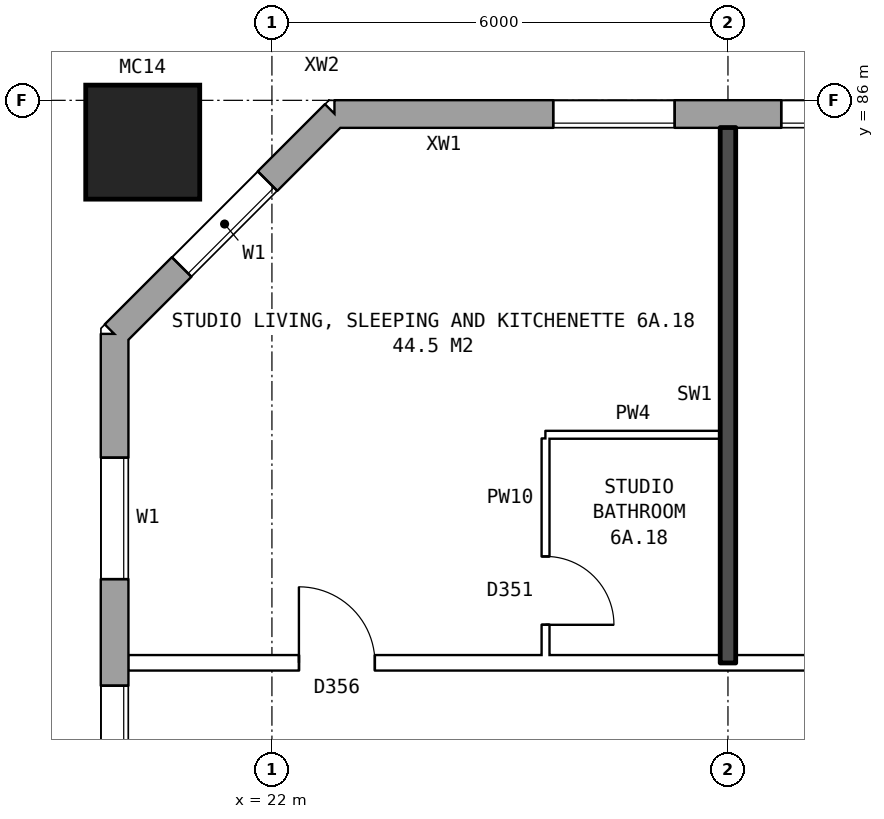
"""IFC4 building model, lengths in metres.
Left out: names, types, materials, properties, quantities, classifications, styles, units other than length and angle.
Written with IfcOpenShell. Run it as: python <this file> out.ifc"""

import sys

from ifc_helpers import new_model, si_unit, direction, frame, frame_2d, origin, origin_2d, place, context, subcontext, project, spatial, rectangle, hollow_rectangle, extrude, element, fill, save


model = new_model("IFC4")
c1 = context("Model", 3, precision=1e-05, world=origin(), true_north=direction((0.0, 1.0)))
c2 = subcontext(c1, "Body", "Model", "MODEL_VIEW")
j1 = project(units=[si_unit("LENGTHUNIT", "METRE"), si_unit("PLANEANGLEUNIT", "RADIAN")], contexts=[c1])
p1 = place(None, origin())
s1 = spatial("IfcSite", under=j1, at=p1, CompositionType="ELEMENT")
p2 = place(p1, origin())
s2 = spatial("IfcBuilding", under=s1, at=p2, CompositionType="ELEMENT")
p3 = place(p2, frame((0.0, 0.0, 25.7)))
s3 = spatial("IfcBuildingStorey", under=s2, at=p3, CompositionType="ELEMENT", Elevation=25.7)
p4 = place(p3, frame((20.3, 85.45, 0.0), z_axis=(0.0, 0.0, 1.0), x_axis=(1.0, 0.0, 0.0)))
e1 = element("IfcColumn", 1, at=p4, inside=s3, PredefinedType="COLUMN", context=c2, shape_type="SweptSolid", body=[
    extrude(hollow_rectangle(XDim=1.5, YDim=1.5, WallThickness=0.08, at=origin_2d()), origin(), (0.0, 0.0, 1.0), 3.1),
])
p5 = place(p3, frame((72.925, 85.82, 0.0), z_axis=(0.0, 0.0, 1.0), x_axis=(-1.0, 0.0, 0.0)))
e2 = element("IfcWall", 2, at=p5, inside=s3, PredefinedType="STANDARD", context=c2, shape_type="SweptSolid", body=[
    extrude(rectangle(XDim=50.101, YDim=0.36, at=frame_2d((25.05, 0.0))), origin(), (0.0, 0.0, 1.0), 2.85),
])
p6 = place(p5, frame((0.625, 0.0, 0.8)))
e3 = element("IfcOpeningElement", 3, at=p6, cuts=e2, PredefinedType="OPENING", context=c2, shape_type="SweptSolid", body=[
    extrude(rectangle(XDim=1.6, YDim=1.8, at=frame_2d((0.8, 0.9))), frame((0.0, 0.19, 0.0), z_axis=(0.0, -1.0, 0.0), x_axis=(1.0, 0.0, 0.0)), (0.0, 0.0, 1.0), 0.38),
])
p7 = place(p5, frame((3.625, 0.0, 0.8)))
e4 = element("IfcOpeningElement", 4, at=p7, cuts=e2, PredefinedType="OPENING", context=c2, shape_type="SweptSolid", body=[
    extrude(rectangle(XDim=1.6, YDim=1.8, at=frame_2d((0.8, 0.9))), frame((0.0, 0.19, 0.0), z_axis=(0.0, -1.0, 0.0), x_axis=(1.0, 0.0, 0.0)), (0.0, 0.0, 1.0), 0.38),
])
p8 = place(p5, frame((5.525, 0.0, 0.8)))
e5 = element("IfcOpeningElement", 5, at=p8, cuts=e2, PredefinedType="OPENING", context=c2, shape_type="SweptSolid", body=[
    extrude(rectangle(XDim=1.4, YDim=1.8, at=frame_2d((0.7, 0.9))), frame((0.0, 0.19, 0.0), z_axis=(0.0, -1.0, 0.0), x_axis=(1.0, 0.0, 0.0)), (0.0, 0.0, 1.0), 0.38),
])
p9 = place(p5, frame((9.175, 0.0, 0.15)))
e6 = element("IfcOpeningElement", 6, at=p9, cuts=e2, PredefinedType="OPENING", context=c2, shape_type="SweptSolid", body=[
    extrude(rectangle(XDim=1.0, YDim=0.9, at=frame_2d((0.5, 0.45))), frame((0.0, 0.19, 0.0), z_axis=(0.0, -1.0, 0.0), x_axis=(1.0, 0.0, 0.0)), (0.0, 0.0, 1.0), 0.38),
])
p10 = place(p5, frame((12.625, 0.0, 0.8)))
e7 = element("IfcOpeningElement", 7, at=p10, cuts=e2, PredefinedType="OPENING", context=c2, shape_type="SweptSolid", body=[
    extrude(rectangle(XDim=1.6, YDim=1.8, at=frame_2d((0.8, 0.9))), frame((0.0, 0.19, 0.0), z_axis=(0.0, -1.0, 0.0), x_axis=(1.0, 0.0, 0.0)), (0.0, 0.0, 1.0), 0.38),
])
p11 = place(p5, frame((15.625, 0.0, 0.8)))
e8 = element("IfcOpeningElement", 8, at=p11, cuts=e2, PredefinedType="OPENING", context=c2, shape_type="SweptSolid", body=[
    extrude(rectangle(XDim=1.6, YDim=1.8, at=frame_2d((0.8, 0.9))), frame((0.0, 0.19, 0.0), z_axis=(0.0, -1.0, 0.0), x_axis=(1.0, 0.0, 0.0)), (0.0, 0.0, 1.0), 0.38),
])
p12 = place(p5, frame((18.625, 0.0, 0.8)))
e9 = element("IfcOpeningElement", 9, at=p12, cuts=e2, PredefinedType="OPENING", context=c2, shape_type="SweptSolid", body=[
    extrude(rectangle(XDim=1.6, YDim=1.8, at=frame_2d((0.8, 0.9))), frame((0.0, 0.19, 0.0), z_axis=(0.0, -1.0, 0.0), x_axis=(1.0, 0.0, 0.0)), (0.0, 0.0, 1.0), 0.38),
])
p13 = place(p5, frame((21.625, 0.0, 0.8)))
e10 = element("IfcOpeningElement", 10, at=p13, cuts=e2, PredefinedType="OPENING", context=c2, shape_type="SweptSolid", body=[
    extrude(rectangle(XDim=1.6, YDim=1.8, at=frame_2d((0.8, 0.9))), frame((0.0, 0.19, 0.0), z_axis=(0.0, -1.0, 0.0), x_axis=(1.0, 0.0, 0.0)), (0.0, 0.0, 1.0), 0.38),
])
p14 = place(p5, frame((24.625, 0.0, 0.8)))
e11 = element("IfcOpeningElement", 11, at=p14, cuts=e2, PredefinedType="OPENING", context=c2, shape_type="SweptSolid", body=[
    extrude(rectangle(XDim=1.6, YDim=1.8, at=frame_2d((0.8, 0.9))), frame((0.0, 0.19, 0.0), z_axis=(0.0, -1.0, 0.0), x_axis=(1.0, 0.0, 0.0)), (0.0, 0.0, 1.0), 0.38),
])
p15 = place(p5, frame((27.625, 0.0, 0.8)))
e12 = element("IfcOpeningElement", 12, at=p15, cuts=e2, PredefinedType="OPENING", context=c2, shape_type="SweptSolid", body=[
    extrude(rectangle(XDim=1.6, YDim=1.8, at=frame_2d((0.8, 0.9))), frame((0.0, 0.19, 0.0), z_axis=(0.0, -1.0, 0.0), x_axis=(1.0, 0.0, 0.0)), (0.0, 0.0, 1.0), 0.38),
])
p16 = place(p5, frame((30.625, 0.0, 0.8)))
e13 = element("IfcOpeningElement", 13, at=p16, cuts=e2, PredefinedType="OPENING", context=c2, shape_type="SweptSolid", body=[
    extrude(rectangle(XDim=1.6, YDim=1.8, at=frame_2d((0.8, 0.9))), frame((0.0, 0.19, 0.0), z_axis=(0.0, -1.0, 0.0), x_axis=(1.0, 0.0, 0.0)), (0.0, 0.0, 1.0), 0.38),
])
p17 = place(p5, frame((33.625, 0.0, 0.8)))
e14 = element("IfcOpeningElement", 14, at=p17, cuts=e2, PredefinedType="OPENING", context=c2, shape_type="SweptSolid", body=[
    extrude(rectangle(XDim=1.6, YDim=1.8, at=frame_2d((0.8, 0.9))), frame((0.0, 0.19, 0.0), z_axis=(0.0, -1.0, 0.0), x_axis=(1.0, 0.0, 0.0)), (0.0, 0.0, 1.0), 0.38),
])
p18 = place(p5, frame((36.625, 0.0, 0.8)))
e15 = element("IfcOpeningElement", 15, at=p18, cuts=e2, PredefinedType="OPENING", context=c2, shape_type="SweptSolid", body=[
    extrude(rectangle(XDim=1.6, YDim=1.8, at=frame_2d((0.8, 0.9))), frame((0.0, 0.19, 0.0), z_axis=(0.0, -1.0, 0.0), x_axis=(1.0, 0.0, 0.0)), (0.0, 0.0, 1.0), 0.38),
])
p19 = place(p5, frame((39.125, 0.0, 0.8)))
e16 = element("IfcOpeningElement", 16, at=p19, cuts=e2, PredefinedType="OPENING", context=c2, shape_type="SweptSolid", body=[
    extrude(rectangle(XDim=0.8, YDim=0.9, at=frame_2d((0.4, 0.45))), frame((0.0, 0.19, 0.0), z_axis=(0.0, -1.0, 0.0), x_axis=(1.0, 0.0, 0.0)), (0.0, 0.0, 1.0), 0.38),
])
p20 = place(p5, frame((42.625, 0.0, 0.8)))
e17 = element("IfcOpeningElement", 17, at=p20, cuts=e2, PredefinedType="OPENING", context=c2, shape_type="SweptSolid", body=[
    extrude(rectangle(XDim=1.6, YDim=1.8, at=frame_2d((0.8, 0.9))), frame((0.0, 0.19, 0.0), z_axis=(0.0, -1.0, 0.0), x_axis=(1.0, 0.0, 0.0)), (0.0, 0.0, 1.0), 0.38),
])
p21 = place(p5, frame((45.625, 0.0, 0.8)))
e18 = element("IfcOpeningElement", 18, at=p21, cuts=e2, PredefinedType="OPENING", context=c2, shape_type="SweptSolid", body=[
    extrude(rectangle(XDim=1.6, YDim=1.8, at=frame_2d((0.8, 0.9))), frame((0.0, 0.19, 0.0), z_axis=(0.0, -1.0, 0.0), x_axis=(1.0, 0.0, 0.0)), (0.0, 0.0, 1.0), 0.38),
])
p22 = place(p5, frame((7.225, 0.0, 1.4)))
e19 = element("IfcOpeningElement", 19, at=p22, cuts=e2, PredefinedType="OPENING", context=c2, shape_type="SweptSolid", body=[
    extrude(rectangle(XDim=1.0, YDim=1.2, at=frame_2d((0.5, 0.6))), frame((0.0, 0.19, 0.0), z_axis=(0.0, -1.0, 0.0), x_axis=(1.0, 0.0, 0.0)), (0.0, 0.0, 1.0), 0.38),
])
p23 = place(p5, frame((10.525, 0.0, 0.15)))
e20 = element("IfcOpeningElement", 20, at=p23, cuts=e2, PredefinedType="OPENING", context=c2, shape_type="SweptSolid", body=[
    extrude(rectangle(XDim=1.2, YDim=1.8, at=frame_2d((0.6, 0.9))), frame((0.0, 0.19, 0.0), z_axis=(0.0, -1.0, 0.0), x_axis=(1.0, 0.0, 0.0)), (0.0, 0.0, 1.0), 0.38),
])
p24 = place(p5, frame((41.375, 0.0, 1.7)))
e21 = element("IfcOpeningElement", 21, at=p24, cuts=e2, PredefinedType="OPENING", context=c2, shape_type="SweptSolid", body=[
    extrude(rectangle(XDim=0.8, YDim=0.9, at=frame_2d((0.4, 0.45))), frame((0.0, 0.19, 0.0), z_axis=(0.0, -1.0, 0.0), x_axis=(1.0, 0.0, 0.0)), (0.0, 0.0, 1.0), 0.38),
])
p25 = place(p3, frame((22.825, 85.82, 0.0), z_axis=(0.0, 0.0, 1.0), x_axis=(-0.707106781187, -0.707106781187, 0.0)))
e22 = element("IfcWall", 22, at=p25, inside=s3, PredefinedType="STANDARD", context=c2, shape_type="SweptSolid", body=[
    extrude(rectangle(XDim=4.094, YDim=0.36, at=frame_2d((2.047, 0.0))), origin(), (0.0, 0.0, 1.0), 2.85),
])
p26 = place(p25, frame((1.247, 0.0, 0.8)))
e23 = element("IfcOpeningElement", 23, at=p26, cuts=e22, PredefinedType="OPENING", context=c2, shape_type="SweptSolid", body=[
    extrude(rectangle(XDim=1.6, YDim=1.8, at=frame_2d((0.8, 0.9))), frame((0.0, 0.19, 0.0), z_axis=(0.0, -1.0, 0.0), x_axis=(1.0, 0.0, 0.0)), (0.0, 0.0, 1.0), 0.38),
])
p27 = place(p3, frame((19.93, 82.925, 0.0), z_axis=(0.0, 0.0, 1.0), x_axis=(0.0, -1.0, 0.0)))
e24 = element("IfcWall", 24, at=p27, inside=s3, PredefinedType="STANDARD", context=c2, shape_type="SweptSolid", body=[
    extrude(rectangle(XDim=25.851, YDim=0.36, at=frame_2d((12.925, 0.0))), origin(), (0.0, 0.0, 1.0), 2.85),
])
p28 = place(p27, frame((1.625, 0.0, 0.8)))
e25 = element("IfcOpeningElement", 25, at=p28, cuts=e24, PredefinedType="OPENING", context=c2, shape_type="SweptSolid", body=[
    extrude(rectangle(XDim=1.6, YDim=1.8, at=frame_2d((0.8, 0.9))), frame((0.0, 0.19, 0.0), z_axis=(0.0, -1.0, 0.0), x_axis=(1.0, 0.0, 0.0)), (0.0, 0.0, 1.0), 0.38),
])
p29 = place(p27, frame((4.625, 0.0, 0.8)))
e26 = element("IfcOpeningElement", 26, at=p29, cuts=e24, PredefinedType="OPENING", context=c2, shape_type="SweptSolid", body=[
    extrude(rectangle(XDim=1.6, YDim=1.8, at=frame_2d((0.8, 0.9))), frame((0.0, 0.19, 0.0), z_axis=(0.0, -1.0, 0.0), x_axis=(1.0, 0.0, 0.0)), (0.0, 0.0, 1.0), 0.38),
])
p30 = place(p27, frame((6.525, 0.0, 0.8)))
e27 = element("IfcOpeningElement", 27, at=p30, cuts=e24, PredefinedType="OPENING", context=c2, shape_type="SweptSolid", body=[
    extrude(rectangle(XDim=1.6, YDim=1.8, at=frame_2d((0.8, 0.9))), frame((0.0, 0.19, 0.0), z_axis=(0.0, -1.0, 0.0), x_axis=(1.0, 0.0, 0.0)), (0.0, 0.0, 1.0), 0.38),
])
p31 = place(p27, frame((8.425, 0.0, 1.1)))
e28 = element("IfcOpeningElement", 28, at=p31, cuts=e24, PredefinedType="OPENING", context=c2, shape_type="SweptSolid", body=[
    extrude(rectangle(XDim=0.8, YDim=1.5, at=frame_2d((0.4, 0.75))), frame((0.0, 0.19, 0.0), z_axis=(0.0, -1.0, 0.0), x_axis=(1.0, 0.0, 0.0)), (0.0, 0.0, 1.0), 0.38),
])
p32 = place(p27, frame((9.525, 0.0, 1.6)))
e29 = element("IfcOpeningElement", 29, at=p32, cuts=e24, PredefinedType="OPENING", context=c2, shape_type="SweptSolid", body=[
    extrude(rectangle(XDim=0.6, YDim=0.9, at=frame_2d((0.3, 0.45))), frame((0.0, 0.19, 0.0), z_axis=(0.0, -1.0, 0.0), x_axis=(1.0, 0.0, 0.0)), (0.0, 0.0, 1.0), 0.38),
])
p33 = place(p27, frame((11.525, 0.0, 0.8)))
e30 = element("IfcOpeningElement", 30, at=p33, cuts=e24, PredefinedType="OPENING", context=c2, shape_type="SweptSolid", body=[
    extrude(rectangle(XDim=0.6, YDim=0.9, at=frame_2d((0.3, 0.45))), frame((0.0, 0.19, 0.0), z_axis=(0.0, -1.0, 0.0), x_axis=(1.0, 0.0, 0.0)), (0.0, 0.0, 1.0), 0.38),
])
p34 = place(p27, frame((19.625, 0.0, 0.8)))
e31 = element("IfcOpeningElement", 31, at=p34, cuts=e24, PredefinedType="OPENING", context=c2, shape_type="SweptSolid", body=[
    extrude(rectangle(XDim=1.6, YDim=1.8, at=frame_2d((0.8, 0.9))), frame((0.0, 0.19, 0.0), z_axis=(0.0, -1.0, 0.0), x_axis=(1.0, 0.0, 0.0)), (0.0, 0.0, 1.0), 0.38),
])
p35 = place(p27, frame((22.625, 0.0, 0.8)))
e32 = element("IfcOpeningElement", 32, at=p35, cuts=e24, PredefinedType="OPENING", context=c2, shape_type="SweptSolid", body=[
    extrude(rectangle(XDim=1.6, YDim=1.8, at=frame_2d((0.8, 0.9))), frame((0.0, 0.19, 0.0), z_axis=(0.0, -1.0, 0.0), x_axis=(1.0, 0.0, 0.0)), (0.0, 0.0, 1.0), 0.38),
])
p36 = place(p27, frame((12.425, 0.0, 0.8)))
e33 = element("IfcOpeningElement", 33, at=p36, cuts=e24, PredefinedType="OPENING", context=c2, shape_type="SweptSolid", body=[
    extrude(rectangle(XDim=1.0, YDim=1.8, at=frame_2d((0.5, 0.9))), frame((0.0, 0.19, 0.0), z_axis=(0.0, -1.0, 0.0), x_axis=(1.0, 0.0, 0.0)), (0.0, 0.0, 1.0), 0.38),
])
p37 = place(p27, frame((13.725, 0.0, 0.8)))
e34 = element("IfcOpeningElement", 34, at=p37, cuts=e24, PredefinedType="OPENING", context=c2, shape_type="SweptSolid", body=[
    extrude(rectangle(XDim=0.6, YDim=0.9, at=frame_2d((0.3, 0.45))), frame((0.0, 0.19, 0.0), z_axis=(0.0, -1.0, 0.0), x_axis=(1.0, 0.0, 0.0)), (0.0, 0.0, 1.0), 0.38),
])
p38 = place(p27, frame((15.575, 0.0, 1.7)))
e35 = element("IfcOpeningElement", 35, at=p38, cuts=e24, PredefinedType="OPENING", context=c2, shape_type="SweptSolid", body=[
    extrude(rectangle(XDim=0.6, YDim=0.9, at=frame_2d((0.3, 0.45))), frame((0.0, 0.19, 0.0), z_axis=(0.0, -1.0, 0.0), x_axis=(1.0, 0.0, 0.0)), (0.0, 0.0, 1.0), 0.38),
])
p39 = place(p27, frame((16.575, 0.0, 1.1)))
e36 = element("IfcOpeningElement", 36, at=p39, cuts=e24, PredefinedType="OPENING", context=c2, shape_type="SweptSolid", body=[
    extrude(rectangle(XDim=0.8, YDim=1.5, at=frame_2d((0.4, 0.75))), frame((0.0, 0.19, 0.0), z_axis=(0.0, -1.0, 0.0), x_axis=(1.0, 0.0, 0.0)), (0.0, 0.0, 1.0), 0.38),
])
p40 = place(p27, frame((17.675, 0.0, 0.8)))
e37 = element("IfcOpeningElement", 37, at=p40, cuts=e24, PredefinedType="OPENING", context=c2, shape_type="SweptSolid", body=[
    extrude(rectangle(XDim=1.6, YDim=1.8, at=frame_2d((0.8, 0.9))), frame((0.0, 0.19, 0.0), z_axis=(0.0, -1.0, 0.0), x_axis=(1.0, 0.0, 0.0)), (0.0, 0.0, 1.0), 0.38),
])
p41 = place(p3, frame((20.11, 78.6, 0.0), z_axis=(0.0, 0.0, 1.0), x_axis=(1.0, 0.0, 0.0)))
e38 = element("IfcWall", 38, at=p41, inside=s3, PredefinedType="PARTITIONING", context=c2, shape_type="SweptSolid", body=[
    extrude(rectangle(XDim=25.79, YDim=0.2, at=frame_2d((12.895, 0.0))), origin(), (0.0, 0.0, 1.0), 2.85),
])
p42 = place(p41, frame((22.34, 0.0, 0.0)))
e39 = element("IfcOpeningElement", 39, at=p42, cuts=e38, PredefinedType="OPENING", context=c2, shape_type="SweptSolid", body=[
    extrude(rectangle(XDim=1.0, YDim=2.1, at=frame_2d((0.5, 1.05))), frame((0.0, 0.11, 0.0), z_axis=(0.0, -1.0, 0.0), x_axis=(1.0, 0.0, 0.0)), (0.0, 0.0, 1.0), 0.22),
])
p43 = place(p41, frame((10.39, 0.0, 0.0)))
e40 = element("IfcOpeningElement", 40, at=p43, cuts=e38, PredefinedType="OPENING", context=c2, shape_type="SweptSolid", body=[
    extrude(rectangle(XDim=1.0, YDim=2.1, at=frame_2d((0.5, 1.05))), frame((0.0, 0.11, 0.0), z_axis=(0.0, -1.0, 0.0), x_axis=(1.0, 0.0, 0.0)), (0.0, 0.0, 1.0), 0.22),
])
p44 = place(p41, frame((2.245, 0.0, 0.0)))
e41 = element("IfcOpeningElement", 41, at=p44, cuts=e38, PredefinedType="OPENING", context=c2, shape_type="SweptSolid", body=[
    extrude(rectangle(XDim=1.0, YDim=2.1, at=frame_2d((0.5, 1.05))), frame((0.0, 0.11, 0.0), z_axis=(0.0, -1.0, 0.0), x_axis=(1.0, 0.0, 0.0)), (0.0, 0.0, 1.0), 0.22),
])
p45 = place(p3, frame((25.6, 81.6, 0.0), z_axis=(0.0, 0.0, 1.0), x_axis=(1.0, 0.0, 0.0)))
e42 = element("IfcWall", 42, at=p45, inside=s3, PredefinedType="PARTITIONING", context=c2, shape_type="SweptSolid", body=[
    extrude(rectangle(XDim=2.3, YDim=0.1, at=frame_2d((1.15, 0.0))), origin(), (0.0, 0.0, 1.0), 2.85),
])
p46 = place(p3, frame((25.6, 78.7, 0.0), z_axis=(0.0, 0.0, 1.0), x_axis=(0.0, 1.0, 0.0)))
e43 = element("IfcWall", 43, at=p46, inside=s3, PredefinedType="PARTITIONING", context=c2, shape_type="SweptSolid", body=[
    extrude(rectangle(XDim=2.85, YDim=0.1, at=frame_2d((1.425, 0.0))), origin(), (0.0, 0.0, 1.0), 2.85),
])
p47 = place(p46, frame((0.4, 0.0, 0.0)))
e44 = element("IfcOpeningElement", 44, at=p47, cuts=e43, PredefinedType="OPENING", context=c2, shape_type="SweptSolid", body=[
    extrude(rectangle(XDim=0.9, YDim=2.1, at=frame_2d((0.45, 1.05))), frame((0.0, 0.06, 0.0), z_axis=(0.0, -1.0, 0.0), x_axis=(1.0, 0.0, 0.0)), (0.0, 0.0, 1.0), 0.12),
])
p48 = place(p3, frame((28.0, 78.6, 0.0), z_axis=(0.0, 0.0, 1.0), x_axis=(0.0, 1.0, 0.0)))
e45 = element("IfcWall", 45, at=p48, inside=s3, PredefinedType="SOLIDWALL", context=c2, shape_type="SweptSolid", body=[
    extrude(rectangle(XDim=7.04, YDim=0.2, at=frame_2d((3.52, 0.0))), origin(), (0.0, 0.0, 1.0), 2.85),
])
p49 = place(p20, origin())
e46 = element("IfcWindow", 46, at=p49, inside=s3, PartitioningType="SINGLE_PANEL", PredefinedType="WINDOW", context=c2, shape_type="SweptSolid", body=[
    extrude(rectangle(XDim=1.6, YDim=1.8, at=frame_2d((0.8, 0.9))), frame((0.0, 0.15, 0.0), z_axis=(0.0, -1.0, 0.0), x_axis=(1.0, 0.0, 0.0)), (0.0, 0.0, 1.0), 0.06),
])
fill(e17, e46)
p50 = place(p21, origin())
e47 = element("IfcWindow", 47, at=p50, inside=s3, PartitioningType="SINGLE_PANEL", PredefinedType="WINDOW", context=c2, shape_type="SweptSolid", body=[
    extrude(rectangle(XDim=1.6, YDim=1.8, at=frame_2d((0.8, 0.9))), frame((0.0, 0.15, 0.0), z_axis=(0.0, -1.0, 0.0), x_axis=(1.0, 0.0, 0.0)), (0.0, 0.0, 1.0), 0.06),
])
fill(e18, e47)
p51 = place(p26, origin())
e48 = element("IfcWindow", 48, at=p51, inside=s3, PartitioningType="SINGLE_PANEL", PredefinedType="WINDOW", context=c2, shape_type="SweptSolid", body=[
    extrude(rectangle(XDim=1.6, YDim=1.8, at=frame_2d((0.8, 0.9))), frame((0.0, 0.15, 0.0), z_axis=(0.0, -1.0, 0.0), x_axis=(1.0, 0.0, 0.0)), (0.0, 0.0, 1.0), 0.06),
])
fill(e23, e48)
p52 = place(p28, origin())
e49 = element("IfcWindow", 49, at=p52, inside=s3, PartitioningType="SINGLE_PANEL", PredefinedType="WINDOW", context=c2, shape_type="SweptSolid", body=[
    extrude(rectangle(XDim=1.6, YDim=1.8, at=frame_2d((0.8, 0.9))), frame((0.0, 0.15, 0.0), z_axis=(0.0, -1.0, 0.0), x_axis=(1.0, 0.0, 0.0)), (0.0, 0.0, 1.0), 0.06),
])
fill(e25, e49)
p53 = place(p29, origin())
e50 = element("IfcWindow", 50, at=p53, inside=s3, PartitioningType="SINGLE_PANEL", PredefinedType="WINDOW", context=c2, shape_type="SweptSolid", body=[
    extrude(rectangle(XDim=1.6, YDim=1.8, at=frame_2d((0.8, 0.9))), frame((0.0, 0.15, 0.0), z_axis=(0.0, -1.0, 0.0), x_axis=(1.0, 0.0, 0.0)), (0.0, 0.0, 1.0), 0.06),
])
fill(e26, e50)
p54 = place(p44, origin())
e51 = element("IfcDoor", 51, at=p54, inside=s3, OperationType="SINGLE_SWING_LEFT", PredefinedType="DOOR", context=c2, shape_type="SweptSolid", body=[
    extrude(rectangle(XDim=1.0, YDim=2.1, at=frame_2d((0.5, 1.05))), frame((0.0, 0.025, 0.0), z_axis=(0.0, -1.0, 0.0), x_axis=(1.0, 0.0, 0.0)), (0.0, 0.0, 1.0), 0.05),
])
fill(e41, e51)
p55 = place(p47, frame((0.9, 0.0, 0.0), z_axis=(0.0, 0.0, 1.0), x_axis=(-1.0, 0.0, 0.0)))
e52 = element("IfcDoor", 52, at=p55, inside=s3, OperationType="SINGLE_SWING_RIGHT", PredefinedType="DOOR", context=c2, shape_type="SweptSolid", body=[
    extrude(rectangle(XDim=0.9, YDim=2.1, at=frame_2d((0.45, 1.05))), frame((0.0, 0.025, 0.0), z_axis=(0.0, -1.0, 0.0), x_axis=(1.0, 0.0, 0.0)), (0.0, 0.0, 1.0), 0.05),
])
fill(e44, e52)
save(model, sys.argv[1])
